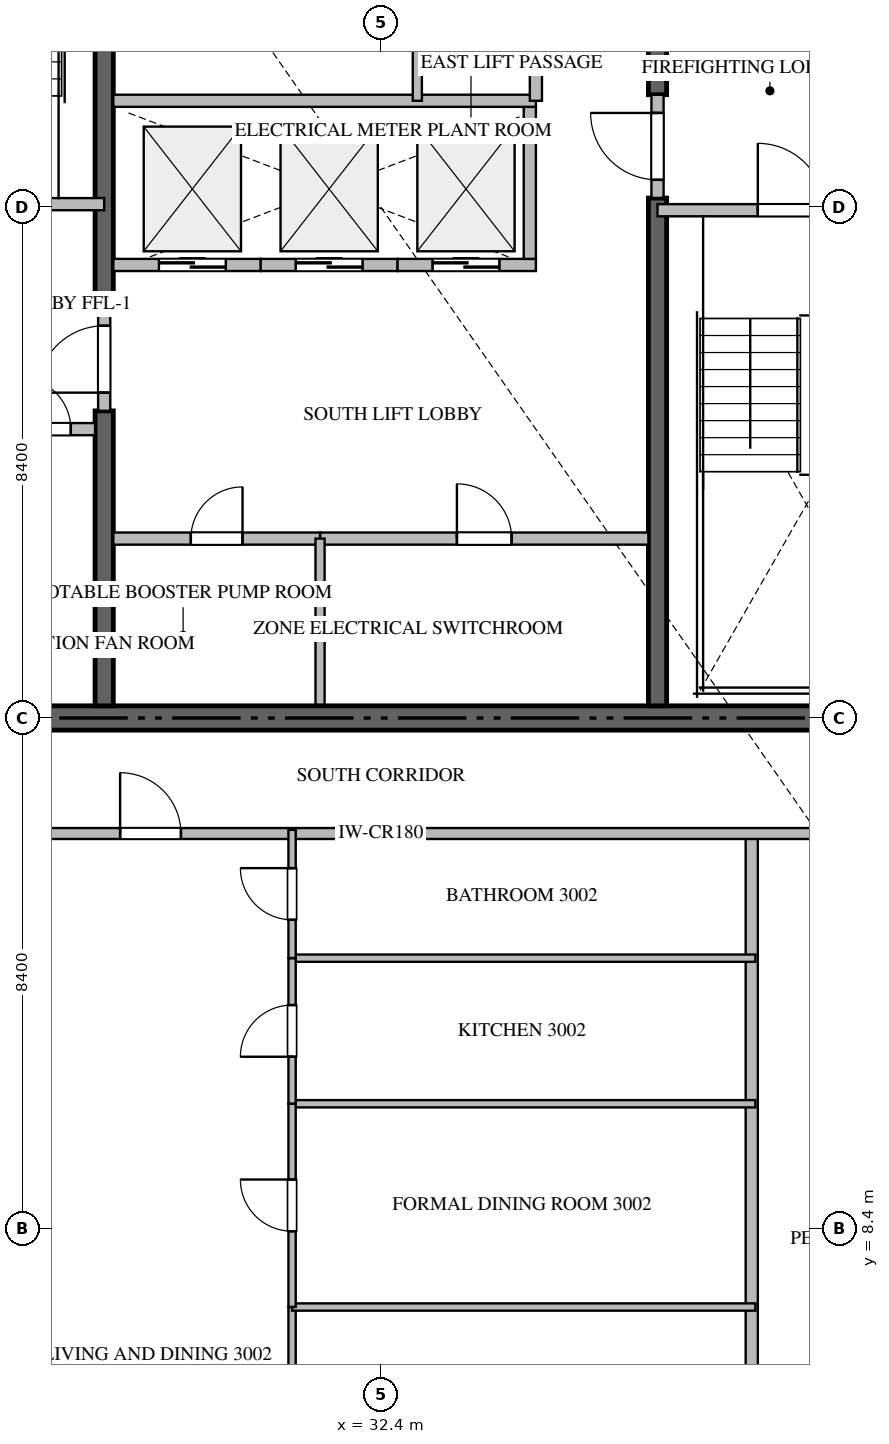
"""IFC4 building model, lengths in metres.
Left out: names, types, materials, properties, quantities, classifications, styles, units other than length and angle.
Written with IfcOpenShell. Run it as: python <this file> out.ifc"""

import sys

from ifc_helpers import new_model, si_unit, direction, frame, frame_2d, origin, place, context, subcontext, project, spatial, rectangle, extrude, source, transform, mapped, element, fill, save


model = new_model("IFC4")
c1 = context("Model", 3, precision=1e-05, world=origin(), true_north=direction((0.0, 1.0)))
c2 = subcontext(c1, "Body", "Model", "MODEL_VIEW")
j1 = project(units=[si_unit("LENGTHUNIT", "METRE"), si_unit("PLANEANGLEUNIT", "RADIAN")], contexts=[c1])
p1 = place(None, origin())
s1 = spatial("IfcSite", under=j1, at=p1, CompositionType="ELEMENT")
p2 = place(p1, origin())
s2 = spatial("IfcBuilding", under=s1, at=p2, CompositionType="ELEMENT")
p3 = place(p2, frame((0.0, 0.0, 123.9)))
s3 = spatial("IfcBuildingStorey", under=s2, at=p3, CompositionType="ELEMENT", Elevation=123.9)
p4 = place(p3, frame((23.4, 16.8, -0.26), z_axis=(0.0, 0.0, 1.0), x_axis=(1.0, 0.0, 0.0)))
e1 = element("IfcWall", 1, at=p4, inside=s3, PredefinedType="SHEAR", context=c2, shape_type="SweptSolid", body=[
    extrude(rectangle(XDim=18.0, YDim=0.4, at=frame_2d((9.0, 0.0))), origin(), (0.0, 0.0, 1.0), 3.748),
])
p5 = place(p3, frame((27.85, 17.0, -0.26), z_axis=(0.0, 0.0, 1.0), x_axis=(0.0, 1.0, 0.0)))
e2 = element("IfcWall", 2, at=p5, inside=s3, PredefinedType="SHEAR", context=c2, shape_type="SweptSolid", body=[
    extrude(rectangle(XDim=4.85, YDim=0.3, at=frame_2d((2.425, 0.0))), origin(), (0.0, 0.0, 1.0), 3.748),
])
p6 = place(p3, frame((27.85, 23.55, -0.26), z_axis=(0.0, 0.0, 1.0), x_axis=(0.0, 1.0, 0.0)))
e3 = element("IfcWall", 3, at=p6, inside=s3, PredefinedType="SHEAR", context=c2, shape_type="SweptSolid", body=[
    extrude(rectangle(XDim=9.85, YDim=0.3, at=frame_2d((4.925, 0.0))), origin(), (0.0, 0.0, 1.0), 3.748),
])
p7 = place(p3, frame((36.95, 17.0, -0.26), z_axis=(0.0, 0.0, 1.0), x_axis=(0.0, 1.0, 0.0)))
e4 = element("IfcWall", 4, at=p7, inside=s3, PredefinedType="SHEAR", context=c2, shape_type="SweptSolid", body=[
    extrude(rectangle(XDim=8.35, YDim=0.3, at=frame_2d((4.175, 0.0))), origin(), (0.0, 0.0, 1.0), 3.748),
])
p8 = place(p3, frame((36.95, 27.05, -0.26), z_axis=(0.0, 0.0, 1.0), x_axis=(0.0, 1.0, 0.0)))
e5 = element("IfcWall", 5, at=p8, inside=s3, PredefinedType="SHEAR", context=c2, shape_type="SweptSolid", body=[
    extrude(rectangle(XDim=6.35, YDim=0.3, at=frame_2d((3.175, 0.0))), origin(), (0.0, 0.0, 1.0), 3.748),
])
p9 = place(p3, frame((23.4, 25.25, 0.0), z_axis=(0.0, 0.0, 1.0), x_axis=(1.0, 0.0, 0.0)))
e6 = element("IfcWall", 6, at=p9, inside=s3, PredefinedType="STANDARD", context=c2, shape_type="SweptSolid", body=[
    extrude(rectangle(XDim=4.45, YDim=0.2, at=frame_2d((2.225, 0.0))), origin(), (0.0, 0.0, 1.0), 3.49),
])
p10 = place(p9, frame((1.65, 0.0, 0.0)))
e7 = element("IfcOpeningElement", 7, at=p10, cuts=e6, PredefinedType="OPENING", context=c2, shape_type="SweptSolid", body=[
    extrude(rectangle(XDim=1.1, YDim=2.15, at=frame_2d((0.55, 1.075))), frame((0.0, 0.11, 0.0), z_axis=(0.0, -1.0, 0.0), x_axis=(1.0, 0.0, 0.0)), (0.0, 0.0, 1.0), 0.22),
])
p11 = place(p3, frame((36.95, 25.15, 0.0), z_axis=(0.0, 0.0, 1.0), x_axis=(1.0, 0.0, 0.0)))
e8 = element("IfcWall", 8, at=p11, inside=s3, PredefinedType="STANDARD", context=c2, shape_type="SweptSolid", body=[
    extrude(rectangle(XDim=4.45, YDim=0.2, at=frame_2d((2.225, 0.0))), origin(), (0.0, 0.0, 1.0), 3.49),
])
p12 = place(p11, frame((1.65, 0.0, 0.0)))
e9 = element("IfcOpeningElement", 9, at=p12, cuts=e8, PredefinedType="OPENING", context=c2, shape_type="SweptSolid", body=[
    extrude(rectangle(XDim=1.1, YDim=2.15, at=frame_2d((0.55, 1.075))), frame((0.0, 0.11, 0.0), z_axis=(0.0, -1.0, 0.0), x_axis=(1.0, 0.0, 0.0)), (0.0, 0.0, 1.0), 0.22),
])
p13 = place(p3, frame((28.0, 24.25, 0.0), z_axis=(0.0, 0.0, 1.0), x_axis=(1.0, 0.0, 0.0)))
e10 = element("IfcWall", 10, at=p13, inside=s3, PredefinedType="STANDARD", context=c2, shape_type="SweptSolid", body=[
    extrude(rectangle(XDim=2.425, YDim=0.2, at=frame_2d((1.212, 0.0))), origin(), (0.0, 0.0, 1.0), 3.49),
])
p14 = place(p13, frame((0.75, 0.0, 0.0)))
e11 = element("IfcOpeningElement", 11, at=p14, cuts=e10, PredefinedType="OPENING", context=c2, shape_type="SweptSolid", body=[
    extrude(rectangle(XDim=1.1, YDim=2.2, at=frame_2d((0.55, 1.1))), frame((0.0, 0.11, 0.0), z_axis=(0.0, -1.0, 0.0), x_axis=(1.0, 0.0, 0.0)), (0.0, 0.0, 1.0), 0.22),
])
p15 = place(p3, frame((30.425, 24.25, 0.0), z_axis=(0.0, 0.0, 1.0), x_axis=(1.0, 0.0, 0.0)))
e12 = element("IfcWall", 12, at=p15, inside=s3, PredefinedType="STANDARD", context=c2, shape_type="SweptSolid", body=[
    extrude(rectangle(XDim=2.25, YDim=0.2, at=frame_2d((1.125, 0.0))), origin(), (0.0, 0.0, 1.0), 3.49),
])
p16 = place(p15, frame((0.575, 0.0, 0.0)))
e13 = element("IfcOpeningElement", 13, at=p16, cuts=e12, PredefinedType="OPENING", context=c2, shape_type="SweptSolid", body=[
    extrude(rectangle(XDim=1.1, YDim=2.2, at=frame_2d((0.55, 1.1))), frame((0.0, 0.11, 0.0), z_axis=(0.0, -1.0, 0.0), x_axis=(1.0, 0.0, 0.0)), (0.0, 0.0, 1.0), 0.22),
])
p17 = place(p3, frame((32.675, 24.25, 0.0), z_axis=(0.0, 0.0, 1.0), x_axis=(1.0, 0.0, 0.0)))
e14 = element("IfcWall", 14, at=p17, inside=s3, PredefinedType="STANDARD", context=c2, shape_type="SweptSolid", body=[
    extrude(rectangle(XDim=2.275, YDim=0.2, at=frame_2d((1.137, 0.0))), origin(), (0.0, 0.0, 1.0), 3.49),
])
p18 = place(p17, frame((0.575, 0.0, 0.0)))
e15 = element("IfcOpeningElement", 15, at=p18, cuts=e14, PredefinedType="OPENING", context=c2, shape_type="SweptSolid", body=[
    extrude(rectangle(XDim=1.1, YDim=2.2, at=frame_2d((0.55, 1.1))), frame((0.0, 0.11, 0.0), z_axis=(0.0, -1.0, 0.0), x_axis=(1.0, 0.0, 0.0)), (0.0, 0.0, 1.0), 0.22),
])
p19 = place(p3, frame((34.85, 24.35, 0.0), z_axis=(0.0, 0.0, 1.0), x_axis=(0.0, 1.0, 0.0)))
e16 = element("IfcWall", 16, at=p19, inside=s3, PredefinedType="STANDARD", context=c2, shape_type="SweptSolid", body=[
    extrude(rectangle(XDim=2.5, YDim=0.2, at=frame_2d((1.25, 0.0))), origin(), (0.0, 0.0, 1.0), 3.49),
])
p20 = place(p3, frame((26.052, 21.55, 0.0), z_axis=(0.0, 0.0, 1.0), x_axis=(1.0, 0.0, 0.0)))
e17 = element("IfcWall", 17, at=p20, inside=s3, PredefinedType="STANDARD", context=c2, shape_type="SweptSolid", body=[
    extrude(rectangle(XDim=1.648, YDim=0.2, at=frame_2d((0.824, 0.0))), origin(), (0.0, 0.0, 1.0), 3.49),
])
p21 = place(p20, frame((0.399, 0.0, 0.0)))
e18 = element("IfcOpeningElement", 18, at=p21, cuts=e17, PredefinedType="OPENING", context=c2, shape_type="SweptSolid", body=[
    extrude(rectangle(XDim=0.85, YDim=2.1, at=frame_2d((0.425, 1.05))), frame((0.0, 0.11, 0.0), z_axis=(0.0, -1.0, 0.0), x_axis=(1.0, 0.0, 0.0)), (0.0, 0.0, 1.0), 0.22),
])
p22 = place(p3, frame((27.85, 21.852, 0.0), z_axis=(0.0, 0.0, 1.0), x_axis=(0.0, 1.0, 0.0)))
e19 = element("IfcWall", 19, at=p22, inside=s3, PredefinedType="STANDARD", context=c2, shape_type="SweptSolid", body=[
    extrude(rectangle(XDim=1.696, YDim=0.2, at=frame_2d((0.848, 0.0))), origin(), (0.0, 0.0, 1.0), 3.49),
])
p23 = place(p22, frame((0.298, 0.0, 0.0)))
e20 = element("IfcOpeningElement", 20, at=p23, cuts=e19, PredefinedType="OPENING", context=c2, shape_type="SweptSolid", body=[
    extrude(rectangle(XDim=1.1, YDim=2.15, at=frame_2d((0.55, 1.075))), frame((0.0, 0.11, 0.0), z_axis=(0.0, -1.0, 0.0), x_axis=(1.0, 0.0, 0.0)), (0.0, 0.0, 1.0), 0.22),
])
p24 = place(p3, frame((36.95, 25.352, 0.0), z_axis=(0.0, 0.0, 1.0), x_axis=(0.0, 1.0, 0.0)))
e21 = element("IfcWall", 21, at=p24, inside=s3, PredefinedType="STANDARD", context=c2, shape_type="SweptSolid", body=[
    extrude(rectangle(XDim=1.696, YDim=0.2, at=frame_2d((0.848, 0.0))), origin(), (0.0, 0.0, 1.0), 3.49),
])
p25 = place(p24, frame((0.298, 0.0, 0.0)))
e22 = element("IfcOpeningElement", 22, at=p25, cuts=e21, PredefinedType="OPENING", context=c2, shape_type="SweptSolid", body=[
    extrude(rectangle(XDim=1.1, YDim=2.15, at=frame_2d((0.55, 1.075))), frame((0.0, 0.11, 0.0), z_axis=(0.0, -1.0, 0.0), x_axis=(1.0, 0.0, 0.0)), (0.0, 0.0, 1.0), 0.22),
])
p26 = place(p3, frame((28.0, 26.95, 0.0), z_axis=(0.0, 0.0, 1.0), x_axis=(1.0, 0.0, 0.0)))
e23 = element("IfcWall", 23, at=p26, inside=s3, PredefinedType="STANDARD", context=c2, shape_type="SweptSolid", body=[
    extrude(rectangle(XDim=6.95, YDim=0.2, at=frame_2d((3.475, 0.0))), origin(), (0.0, 0.0, 1.0), 3.49),
])
p27 = place(p3, frame((34.95, 26.95, 0.0), z_axis=(0.0, 0.0, 1.0), x_axis=(0.0, 1.0, 0.0)))
e24 = element("IfcWall", 24, at=p27, inside=s3, PredefinedType="STANDARD", context=c2, shape_type="SweptSolid", body=[
    extrude(rectangle(XDim=3.6, YDim=0.2, at=frame_2d((1.8, 0.0))), origin(), (0.0, 0.0, 1.0), 3.49),
])
p28 = place(p27, frame((1.35, 0.0, 0.0)))
e25 = element("IfcOpeningElement", 25, at=p28, cuts=e24, PredefinedType="OPENING", context=c2, shape_type="SweptSolid", body=[
    extrude(rectangle(XDim=0.9, YDim=2.1, at=frame_2d((0.45, 1.05))), frame((0.0, 0.11, 0.0), z_axis=(0.0, -1.0, 0.0), x_axis=(1.0, 0.0, 0.0)), (0.0, 0.0, 1.0), 0.22),
])
p29 = place(p3, frame((33.0, 26.95, 0.0), z_axis=(0.0, 0.0, 1.0), x_axis=(0.0, 1.0, 0.0)))
e26 = element("IfcWall", 26, at=p29, inside=s3, PredefinedType="PARTITIONING", context=c2, shape_type="SweptSolid", body=[
    extrude(rectangle(XDim=3.6, YDim=0.15, at=frame_2d((1.8, 0.0))), origin(), (0.0, 0.0, 1.0), 3.49),
])
p30 = place(p29, frame((1.375, 0.0, 0.0)))
e27 = element("IfcOpeningElement", 27, at=p30, cuts=e26, PredefinedType="OPENING", context=c2, shape_type="SweptSolid", body=[
    extrude(rectangle(XDim=0.85, YDim=2.1, at=frame_2d((0.425, 1.05))), frame((0.0, 0.085, 0.0), z_axis=(0.0, -1.0, 0.0), x_axis=(1.0, 0.0, 0.0)), (0.0, 0.0, 1.0), 0.17),
])
p31 = place(p3, frame((28.0, 19.75, 0.0), z_axis=(0.0, 0.0, 1.0), x_axis=(1.0, 0.0, 0.0)))
e28 = element("IfcWall", 28, at=p31, inside=s3, PredefinedType="STANDARD", context=c2, shape_type="SweptSolid", body=[
    extrude(rectangle(XDim=3.4, YDim=0.2, at=frame_2d((1.7, 0.0))), origin(), (0.0, 0.0, 1.0), 3.49),
])
p32 = place(p31, frame((1.275, 0.0, 0.0)))
e29 = element("IfcOpeningElement", 29, at=p32, cuts=e28, PredefinedType="OPENING", context=c2, shape_type="SweptSolid", body=[
    extrude(rectangle(XDim=0.85, YDim=2.1, at=frame_2d((0.425, 1.05))), frame((0.0, 0.11, 0.0), z_axis=(0.0, -1.0, 0.0), x_axis=(1.0, 0.0, 0.0)), (0.0, 0.0, 1.0), 0.22),
])
p33 = place(p3, frame((31.402, 19.75, 0.0), z_axis=(0.0, 0.0, 1.0), x_axis=(1.0, 0.0, 0.0)))
e30 = element("IfcWall", 30, at=p33, inside=s3, PredefinedType="STANDARD", context=c2, shape_type="SweptSolid", body=[
    extrude(rectangle(XDim=5.398, YDim=0.2, at=frame_2d((2.699, 0.0))), origin(), (0.0, 0.0, 1.0), 3.49),
])
p34 = place(p33, frame((2.249, 0.0, 0.0)))
e31 = element("IfcOpeningElement", 31, at=p34, cuts=e30, PredefinedType="OPENING", context=c2, shape_type="SweptSolid", body=[
    extrude(rectangle(XDim=0.9, YDim=2.1, at=frame_2d((0.45, 1.05))), frame((0.0, 0.11, 0.0), z_axis=(0.0, -1.0, 0.0), x_axis=(1.0, 0.0, 0.0)), (0.0, 0.0, 1.0), 0.22),
])
p35 = place(p3, frame((31.4, 17.02, 0.0), z_axis=(0.0, 0.0, 1.0), x_axis=(0.0, 1.0, 0.0)))
e32 = element("IfcWall", 32, at=p35, inside=s3, PredefinedType="PARTITIONING", context=c2, shape_type="SweptSolid", body=[
    extrude(rectangle(XDim=2.73, YDim=0.15, at=frame_2d((1.365, 0.0))), origin(), (0.0, 0.0, 1.0), 3.49),
])
p36 = place(p3, frame((38.5, 1.482, 0.0), z_axis=(0.0, 0.0, 1.0), x_axis=(0.0, 1.0, 0.0)))
e33 = element("IfcWall", 33, at=p36, inside=s3, PredefinedType="PARTITIONING", context=c2, shape_type="SweptSolid", body=[
    extrude(rectangle(XDim=13.418, YDim=0.2, at=frame_2d((6.709, 0.0))), origin(), (0.0, 0.0, 1.0), 3.49),
])
p37 = place(p3, frame((20.952, 14.9, 0.0), z_axis=(0.0, 0.0, 1.0), x_axis=(1.0, 0.0, 0.0)))
e34 = element("IfcWall", 34, at=p37, inside=s3, PredefinedType="PARTITIONING", context=c2, shape_type="SweptSolid", body=[
    extrude(rectangle(XDim=22.896, YDim=0.18, at=frame_2d((11.448, 0.0))), origin(), (0.0, 0.0, 1.0), 3.49),
])
p38 = place(p37, frame((2.781, 0.0, 0.0)))
e35 = element("IfcOpeningElement", 35, at=p38, cuts=e34, PredefinedType="OPENING", context=c2, shape_type="SweptSolid", body=[
    extrude(rectangle(XDim=1.0, YDim=2.15, at=frame_2d((0.5, 1.075))), frame((0.0, 0.1, 0.0), z_axis=(0.0, -1.0, 0.0), x_axis=(1.0, 0.0, 0.0)), (0.0, 0.0, 1.0), 0.2),
])
p39 = place(p37, frame((7.16, 0.0, 0.0)))
e36 = element("IfcOpeningElement", 36, at=p39, cuts=e34, PredefinedType="OPENING", context=c2, shape_type="SweptSolid", body=[
    extrude(rectangle(XDim=1.0, YDim=2.15, at=frame_2d((0.5, 1.075))), frame((0.0, 0.1, 0.0), z_axis=(0.0, -1.0, 0.0), x_axis=(1.0, 0.0, 0.0)), (0.0, 0.0, 1.0), 0.2),
])
p40 = place(p37, frame((19.115, 0.0, 0.0)))
e37 = element("IfcOpeningElement", 37, at=p40, cuts=e34, PredefinedType="OPENING", context=c2, shape_type="SweptSolid", body=[
    extrude(rectangle(XDim=1.0, YDim=2.15, at=frame_2d((0.5, 1.075))), frame((0.0, 0.1, 0.0), z_axis=(0.0, -1.0, 0.0), x_axis=(1.0, 0.0, 0.0)), (0.0, 0.0, 1.0), 0.2),
])
p41 = place(p3, frame((30.94, 1.495, 0.0), z_axis=(0.0, 0.0, 1.0), x_axis=(0.0, 1.0, 0.0)))
e38 = element("IfcWall", 38, at=p41, inside=s3, PredefinedType="PARTITIONING", context=c2, shape_type="SweptSolid", body=[
    extrude(rectangle(XDim=5.618, YDim=0.12, at=frame_2d((2.809, 0.0))), origin(), (0.0, 0.0, 1.0), 3.49),
])
p42 = place(p41, frame((2.595, 0.0, 0.0)))
e39 = element("IfcOpeningElement", 39, at=p42, cuts=e38, PredefinedType="OPENING", context=c2, shape_type="SweptSolid", body=[
    extrude(rectangle(XDim=0.9, YDim=2.1, at=frame_2d((0.45, 1.05))), frame((0.0, 0.07, 0.0), z_axis=(0.0, -1.0, 0.0), x_axis=(1.0, 0.0, 0.0)), (0.0, 0.0, 1.0), 0.14),
])
p43 = place(p3, frame((30.94, 7.113, 0.0), z_axis=(0.0, 0.0, 1.0), x_axis=(1.0, 0.0, 0.0)))
e40 = element("IfcWall", 40, at=p43, inside=s3, PredefinedType="PARTITIONING", context=c2, shape_type="SweptSolid", body=[
    extrude(rectangle(XDim=7.62, YDim=0.12, at=frame_2d((3.81, 0.0))), origin(), (0.0, 0.0, 1.0), 3.49),
])
p44 = place(p3, frame((30.94, 10.456, 0.0), z_axis=(0.0, 0.0, 1.0), x_axis=(1.0, 0.0, 0.0)))
e41 = element("IfcWall", 41, at=p44, inside=s3, PredefinedType="PARTITIONING", context=c2, shape_type="SweptSolid", body=[
    extrude(rectangle(XDim=7.62, YDim=0.12, at=frame_2d((3.81, 0.0))), origin(), (0.0, 0.0, 1.0), 2.972),
])
p45 = place(p3, frame((30.94, 12.85, 0.0), z_axis=(0.0, 0.0, 1.0), x_axis=(1.0, 0.0, 0.0)))
e42 = element("IfcWall", 42, at=p45, inside=s3, PredefinedType="PARTITIONING", context=c2, shape_type="SweptSolid", body=[
    extrude(rectangle(XDim=7.62, YDim=0.12, at=frame_2d((3.81, 0.0))), origin(), (0.0, 0.0, 1.0), 3.49),
])
p46 = place(p3, frame((30.94, 7.115, 0.0), z_axis=(0.0, 0.0, 1.0), x_axis=(0.0, 1.0, 0.0)))
e43 = element("IfcWall", 43, at=p46, inside=s3, PredefinedType="PARTITIONING", context=c2, shape_type="SweptSolid", body=[
    extrude(rectangle(XDim=3.341, YDim=0.12, at=frame_2d((1.67, 0.0))), origin(), (0.0, 0.0, 1.0), 3.49),
])
p47 = place(p46, frame((1.245, 0.0, 0.0)))
e44 = element("IfcOpeningElement", 44, at=p47, cuts=e43, PredefinedType="OPENING", context=c2, shape_type="SweptSolid", body=[
    extrude(rectangle(XDim=0.85, YDim=2.1, at=frame_2d((0.425, 1.05))), frame((0.0, 0.07, 0.0), z_axis=(0.0, -1.0, 0.0), x_axis=(1.0, 0.0, 0.0)), (0.0, 0.0, 1.0), 0.14),
])
p48 = place(p3, frame((30.94, 10.458, 0.0), z_axis=(0.0, 0.0, 1.0), x_axis=(0.0, 1.0, 0.0)))
e45 = element("IfcWall", 45, at=p48, inside=s3, PredefinedType="PARTITIONING", context=c2, shape_type="SweptSolid", body=[
    extrude(rectangle(XDim=2.392, YDim=0.12, at=frame_2d((1.196, 0.0))), origin(), (0.0, 0.0, 1.0), 3.49),
])
p49 = place(p48, frame((0.771, 0.0, 0.0)))
e46 = element("IfcOpeningElement", 46, at=p49, cuts=e45, PredefinedType="OPENING", context=c2, shape_type="SweptSolid", body=[
    extrude(rectangle(XDim=0.85, YDim=2.1, at=frame_2d((0.425, 1.05))), frame((0.0, 0.07, 0.0), z_axis=(0.0, -1.0, 0.0), x_axis=(1.0, 0.0, 0.0)), (0.0, 0.0, 1.0), 0.14),
])
p50 = place(p3, frame((30.94, 12.852, 0.0), z_axis=(0.0, 0.0, 1.0), x_axis=(0.0, 1.0, 0.0)))
e47 = element("IfcWall", 47, at=p50, inside=s3, PredefinedType="PARTITIONING", context=c2, shape_type="SweptSolid", body=[
    extrude(rectangle(XDim=2.108, YDim=0.12, at=frame_2d((1.054, 0.0))), origin(), (0.0, 0.0, 1.0), 3.49),
])
p51 = place(p50, frame((0.629, 0.0, 0.0)))
e48 = element("IfcOpeningElement", 48, at=p51, cuts=e47, PredefinedType="OPENING", context=c2, shape_type="SweptSolid", body=[
    extrude(rectangle(XDim=0.85, YDim=2.1, at=frame_2d((0.425, 1.05))), frame((0.0, 0.07, 0.0), z_axis=(0.0, -1.0, 0.0), x_axis=(1.0, 0.0, 0.0)), (0.0, 0.0, 1.0), 0.14),
])
m1 = source(origin(), c2, "Body", "SweptSolid", [
    extrude(rectangle(XDim=1.1, YDim=2.15, at=frame_2d((0.55, 1.075))), frame((0.0, 0.025, 0.0), z_axis=(0.0, -1.0, 0.0), x_axis=(1.0, 0.0, 0.0)), (0.0, 0.0, 1.0), 0.05),
])
p52 = place(p12, origin())
e49 = element("IfcDoor", 49, at=p52, inside=s3, OperationType="SINGLE_SWING_LEFT", PredefinedType="DOOR", context=c2, shape_type="MappedRepresentation", body=[
    mapped(m1, transform((0.0, 0.0, 0.0), scale=1.0)),
])
fill(e9, e49)
m2 = source(origin(), c2, "Body", "SweptSolid", [
    extrude(rectangle(XDim=1.1, YDim=2.2, at=frame_2d((0.55, 1.1))), frame((0.0, 0.025, 0.0), z_axis=(0.0, -1.0, 0.0), x_axis=(1.0, 0.0, 0.0)), (0.0, 0.0, 1.0), 0.05),
])
p53 = place(p14, origin())
e50 = element("IfcDoor", 50, at=p53, inside=s3, OperationType="DOUBLE_DOOR_SLIDING", PredefinedType="DOOR", context=c2, shape_type="MappedRepresentation", body=[
    mapped(m2, transform((0.0, 0.0, 0.0), scale=1.0)),
])
fill(e11, e50)
p54 = place(p16, origin())
e51 = element("IfcDoor", 51, at=p54, inside=s3, OperationType="DOUBLE_DOOR_SLIDING", PredefinedType="DOOR", context=c2, shape_type="MappedRepresentation", body=[
    mapped(m2, transform((0.0, 0.0, 0.0), scale=1.0)),
])
fill(e13, e51)
p55 = place(p18, origin())
e52 = element("IfcDoor", 52, at=p55, inside=s3, OperationType="DOUBLE_DOOR_SLIDING", PredefinedType="DOOR", context=c2, shape_type="MappedRepresentation", body=[
    mapped(m2, transform((0.0, 0.0, 0.0), scale=1.0)),
])
fill(e15, e52)
m3 = source(origin(), c2, "Body", "SweptSolid", [
    extrude(rectangle(XDim=0.85, YDim=2.1, at=frame_2d((0.425, 1.05))), frame((0.0, 0.025, 0.0), z_axis=(0.0, -1.0, 0.0), x_axis=(1.0, 0.0, 0.0)), (0.0, 0.0, 1.0), 0.05),
])
p56 = place(p21, origin())
e53 = element("IfcDoor", 53, at=p56, inside=s3, OperationType="SINGLE_SWING_LEFT", PredefinedType="DOOR", context=c2, shape_type="MappedRepresentation", body=[
    mapped(m3, transform((0.0, 0.0, 0.0), scale=1.0)),
])
fill(e18, e53)
p57 = place(p23, origin())
e54 = element("IfcDoor", 54, at=p57, inside=s3, OperationType="SINGLE_SWING_LEFT", PredefinedType="DOOR", context=c2, shape_type="MappedRepresentation", body=[
    mapped(m1, transform((0.0, 0.0, 0.0), scale=1.0)),
])
fill(e20, e54)
p58 = place(p25, origin())
e55 = element("IfcDoor", 55, at=p58, inside=s3, OperationType="SINGLE_SWING_RIGHT", PredefinedType="DOOR", context=c2, shape_type="MappedRepresentation", body=[
    mapped(m1, transform((0.0, 0.0, 0.0), scale=1.0)),
])
fill(e22, e55)
p59 = place(p32, origin())
e56 = element("IfcDoor", 56, at=p59, inside=s3, OperationType="SINGLE_SWING_RIGHT", PredefinedType="DOOR", context=c2, shape_type="MappedRepresentation", body=[
    mapped(m3, transform((0.0, 0.0, 0.0), scale=1.0)),
])
fill(e29, e56)
m4 = source(origin(), c2, "Body", "SweptSolid", [
    extrude(rectangle(XDim=0.9, YDim=2.1, at=frame_2d((0.45, 1.05))), frame((0.0, 0.025, 0.0), z_axis=(0.0, -1.0, 0.0), x_axis=(1.0, 0.0, 0.0)), (0.0, 0.0, 1.0), 0.05),
])
p60 = place(p34, origin())
e57 = element("IfcDoor", 57, at=p60, inside=s3, OperationType="SINGLE_SWING_LEFT", PredefinedType="DOOR", context=c2, shape_type="MappedRepresentation", body=[
    mapped(m4, transform((0.0, 0.0, 0.0), scale=1.0)),
])
fill(e31, e57)
m5 = source(origin(), c2, "Body", "SweptSolid", [
    extrude(rectangle(XDim=1.0, YDim=2.15, at=frame_2d((0.5, 1.075))), frame((0.0, 0.025, 0.0), z_axis=(0.0, -1.0, 0.0), x_axis=(1.0, 0.0, 0.0)), (0.0, 0.0, 1.0), 0.05),
])
p61 = place(p39, origin())
e58 = element("IfcDoor", 58, at=p61, inside=s3, OperationType="SINGLE_SWING_LEFT", PredefinedType="DOOR", context=c2, shape_type="MappedRepresentation", body=[
    mapped(m5, transform((0.0, 0.0, 0.0), scale=1.0)),
])
fill(e36, e58)
p62 = place(p47, origin())
e59 = element("IfcDoor", 59, at=p62, inside=s3, OperationType="SINGLE_SWING_RIGHT", PredefinedType="DOOR", context=c2, shape_type="MappedRepresentation", body=[
    mapped(m3, transform((0.0, 0.0, 0.0), scale=1.0)),
])
fill(e44, e59)
p63 = place(p49, origin())
e60 = element("IfcDoor", 60, at=p63, inside=s3, OperationType="SINGLE_SWING_LEFT", PredefinedType="DOOR", context=c2, shape_type="MappedRepresentation", body=[
    mapped(m3, transform((0.0, 0.0, 0.0), scale=1.0)),
])
fill(e46, e60)
p64 = place(p51, origin())
e61 = element("IfcDoor", 61, at=p64, inside=s3, OperationType="SINGLE_SWING_RIGHT", PredefinedType="DOOR", context=c2, shape_type="MappedRepresentation", body=[
    mapped(m3, transform((0.0, 0.0, 0.0), scale=1.0)),
])
fill(e48, e61)
save(model, sys.argv[1])
